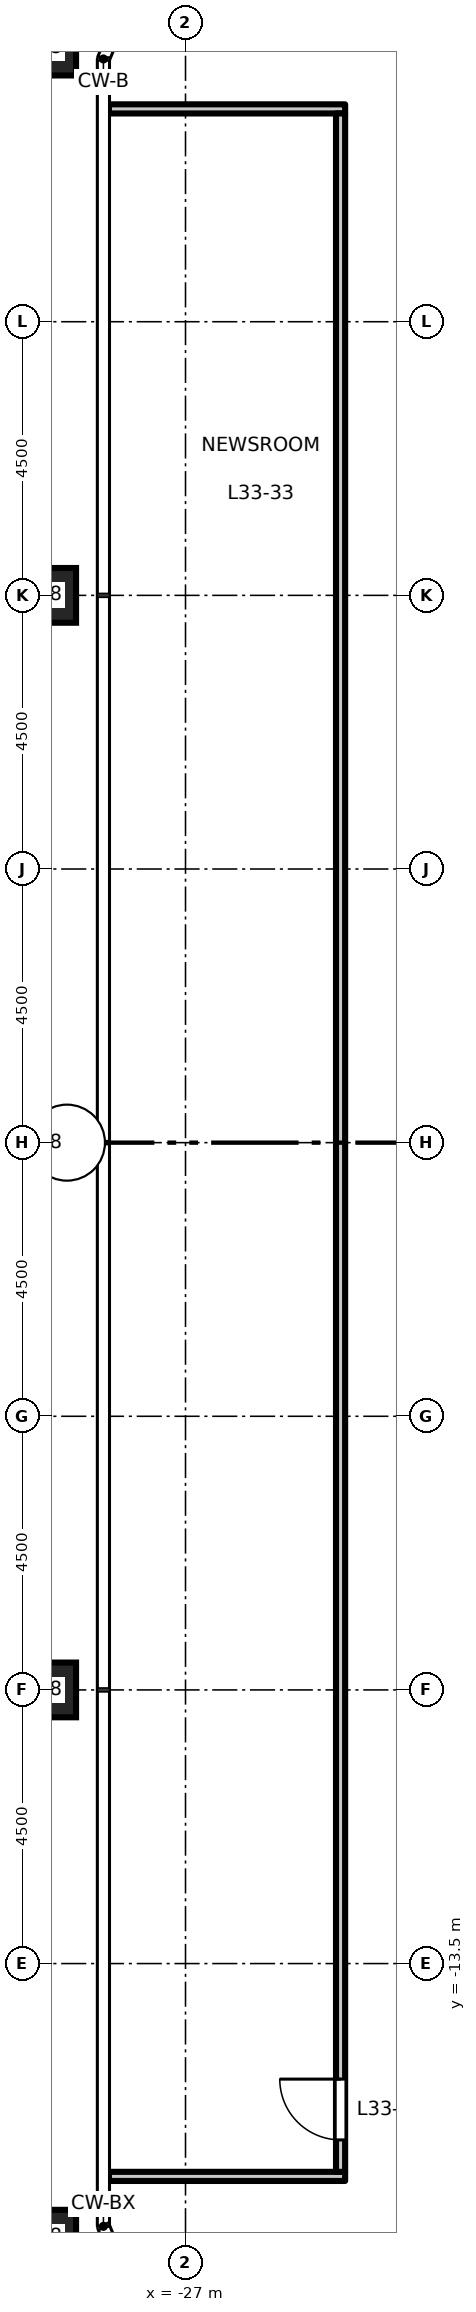
"""IFC4 building model, lengths in metres.
Left out: names, types, materials, properties, quantities, classifications, styles, units other than length and angle.
Written with IfcOpenShell. Run it as: python <this file> out.ifc"""

import sys

from ifc_helpers import new_model, si_unit, direction, frame, frame_2d, origin, origin_2d, place, context, subcontext, project, spatial, rectangle, hollow_rectangle, extrude, element, fill, save


model = new_model("IFC4")
c1 = context("Model", 3, precision=1e-05, world=origin(), true_north=direction((0.0, 1.0)))
c2 = subcontext(c1, "Body", "Model", "MODEL_VIEW")
j1 = project(units=[si_unit("LENGTHUNIT", "METRE"), si_unit("PLANEANGLEUNIT", "RADIAN")], contexts=[c1])
p1 = place(None, origin())
s1 = spatial("IfcSite", under=j1, at=p1, CompositionType="ELEMENT")
p2 = place(p1, origin())
s2 = spatial("IfcBuilding", under=s1, at=p2, CompositionType="ELEMENT")
p3 = place(p2, frame((0.0, 0.0, 154.2)))
s3 = spatial("IfcBuildingStorey", under=s2, at=p3, CompositionType="ELEMENT", Elevation=154.2)
for number, where, z_axis, x_axis in (
    (1, (-29.25, 18.0, 0.0), (0.0, 0.0, 1.0), (1.0, 0.0, 0.0)),
    (2, (-29.25, 9.0, 0.0), (0.0, 0.0, 1.0), (1.0, 0.0, 0.0)),
    (3, (-29.25, 0.0, 0.0), (0.0, 0.0, 1.0), (1.0, 0.0, 0.0)),
    (4, (-29.25, -9.0, 0.0), (0.0, 0.0, 1.0), (1.0, 0.0, 0.0)),
    (5, (-29.25, -18.0, 0.0), (0.0, 0.0, 1.0), (1.0, 0.0, 0.0)),
):
    element("IfcColumn", number, at=place(p3, frame(where, z_axis=z_axis, x_axis=x_axis)), inside=s3, PredefinedType="COLUMN", context=c2, shape_type="SweptSolid", body=[
        extrude(hollow_rectangle(XDim=0.9, YDim=0.9, WallThickness=0.05, at=origin_2d()), origin(), (0.0, 0.0, 1.0), 4.5),
    ])
for number, where, z_axis, x_axis in (
    (6, (-28.26, -17.0, 0.0), (0.0, 0.0, 1.0), (1.0, 0.0, 0.0)),
    (7, (-28.26, 17.0, 0.0), (0.0, 0.0, 1.0), (1.0, 0.0, 0.0)),
):
    element("IfcWall", number, at=place(p3, frame(where, z_axis=z_axis, x_axis=x_axis)), inside=s3, PredefinedType="PARTITIONING", context=c2, shape_type="SweptSolid", body=[
        extrude(rectangle(XDim=3.885, YDim=0.15, at=frame_2d((1.942, 0.0))), origin(), (0.0, 0.0, 1.0), 4.35),
    ])
p4 = place(p3, frame((-24.45, -16.925, 0.0), z_axis=(0.0, 0.0, 1.0), x_axis=(0.0, 1.0, 0.0)))
e8 = element("IfcWall", 8, at=p4, inside=s3, PredefinedType="PARTITIONING", context=c2, shape_type="SweptSolid", body=[
    extrude(rectangle(XDim=33.85, YDim=0.15, at=frame_2d((16.925, 0.0))), origin(), (0.0, 0.0, 1.0), 4.35),
])
p5 = place(p4, frame((0.525, 0.0, 0.0)))
e9 = element("IfcOpeningElement", 9, at=p5, cuts=e8, PredefinedType="OPENING", context=c2, shape_type="SweptSolid", body=[
    extrude(rectangle(XDim=1.0, YDim=2.1, at=frame_2d((0.5, 1.05))), frame((0.0, 0.085, 0.0), z_axis=(0.0, -1.0, 0.0), x_axis=(1.0, 0.0, 0.0)), (0.0, 0.0, 1.0), 0.17),
])
p6 = place(p5, origin())
e10 = element("IfcDoor", 10, at=p6, inside=s3, OperationType="SINGLE_SWING_RIGHT", PredefinedType="DOOR", context=c2, shape_type="SweptSolid", body=[
    extrude(rectangle(XDim=1.0, YDim=2.1, at=frame_2d((0.5, 1.05))), frame((0.0, 0.025, 0.0), z_axis=(0.0, -1.0, 0.0), x_axis=(1.0, 0.0, 0.0)), (0.0, 0.0, 1.0), 0.05),
])
fill(e9, e10)
save(model, sys.argv[1])
